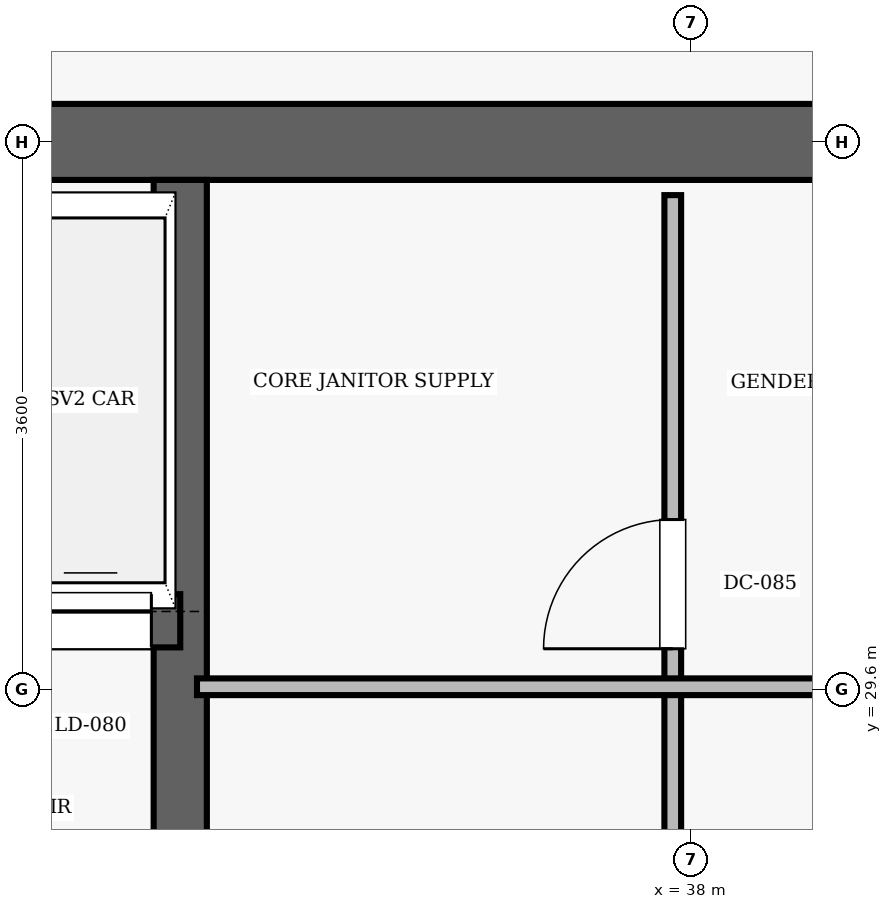
"""IFC4 building model, lengths in metres.
Left out: names, types, materials, properties, quantities, classifications, styles, units other than length and angle.
Written with IfcOpenShell. Run it as: python <this file> out.ifc"""

import sys

from ifc_helpers import new_model, si_unit, direction, frame, frame_2d, origin, place, context, subcontext, project, spatial, rectangle, extrude, element, fill, save


model = new_model("IFC4")
c1 = context("Model", 3, precision=1e-05, world=origin(), true_north=direction((0.0, 1.0)))
c2 = subcontext(c1, "Body", "Model", "MODEL_VIEW")
j1 = project(units=[si_unit("LENGTHUNIT", "METRE"), si_unit("PLANEANGLEUNIT", "RADIAN")], contexts=[c1])
p1 = place(None, origin())
s1 = spatial("IfcSite", under=j1, at=p1, CompositionType="ELEMENT")
p2 = place(p1, origin())
s2 = spatial("IfcBuilding", under=s1, at=p2, CompositionType="ELEMENT")
p3 = place(p2, frame((0.0, 0.0, 178.9)))
s3 = spatial("IfcBuildingStorey", under=s2, at=p3, CompositionType="ELEMENT", Elevation=178.9)
p4 = place(p3, frame((26.75, 33.2, 0.0), z_axis=(0.0, 0.0, 1.0), x_axis=(1.0, 0.0, 0.0)))
e1 = element("IfcWall", 1, at=p4, inside=s3, PredefinedType="SHEAR", context=c2, shape_type="SweptSolid", body=[
    extrude(rectangle(XDim=22.5, YDim=0.5, at=frame_2d((11.25, 0.0))), origin(), (0.0, 0.0, 1.0), 3.85),
])
p5 = place(p4, frame((4.57, 0.0, 0.0)))
e2 = element("IfcOpeningElement", 2, at=p5, cuts=e1, PredefinedType="OPENING", context=c2, shape_type="SweptSolid", body=[
    extrude(rectangle(XDim=1.05, YDim=2.15, at=frame_2d((0.525, 1.075))), frame((0.0, 0.26, 0.0), z_axis=(0.0, -1.0, 0.0), x_axis=(1.0, 0.0, 0.0)), (0.0, 0.0, 1.0), 0.52),
])
p6 = place(p4, frame((14.47, 0.0, 0.0)))
e3 = element("IfcOpeningElement", 3, at=p6, cuts=e1, PredefinedType="OPENING", context=c2, shape_type="SweptSolid", body=[
    extrude(rectangle(XDim=1.05, YDim=2.15, at=frame_2d((0.525, 1.075))), frame((0.0, 0.26, 0.0), z_axis=(0.0, -1.0, 0.0), x_axis=(1.0, 0.0, 0.0)), (0.0, 0.0, 1.0), 0.52),
])
p7 = place(p3, frame((34.64, 26.69, 0.0), z_axis=(0.0, 0.0, 1.0), x_axis=(0.0, 1.0, 0.0)))
e4 = element("IfcWall", 4, at=p7, inside=s3, PredefinedType="SHEAR", context=c2, shape_type="SweptSolid", body=[
    extrude(rectangle(XDim=6.26, YDim=0.35, at=frame_2d((3.13, 0.0))), origin(), (0.0, 0.0, 1.0), 3.85),
])
p8 = place(p3, frame((32.23, 30.05, 0.0), z_axis=(0.0, 0.0, 1.0), x_axis=(1.0, 0.0, 0.0)))
e5 = element("IfcWall", 5, at=p8, inside=s3, PredefinedType="SHEAR", context=c2, shape_type="SweptSolid", body=[
    extrude(rectangle(XDim=2.41, YDim=0.35, at=frame_2d((1.205, 0.0))), origin(), (0.0, 0.0, 1.0), 3.035),
])
p9 = place(p8, frame((0.42, 0.0, 0.0)))
e6 = element("IfcOpeningElement", 6, at=p9, cuts=e5, PredefinedType="OPENING", context=c2, shape_type="SweptSolid", body=[
    extrude(rectangle(XDim=0.8, YDim=2.15, at=frame_2d((0.4, 1.075))), frame((0.0, 0.185, 0.0), z_axis=(0.0, -1.0, 0.0), x_axis=(1.0, 0.0, 0.0)), (0.0, 0.0, 1.0), 0.37),
])
p10 = place(p8, frame((1.42, 0.0, 0.0)))
e7 = element("IfcOpeningElement", 7, at=p10, cuts=e5, PredefinedType="OPENING", context=c2, shape_type="SweptSolid", body=[
    extrude(rectangle(XDim=0.8, YDim=2.15, at=frame_2d((0.4, 1.075))), frame((0.0, 0.185, 0.0), z_axis=(0.0, -1.0, 0.0), x_axis=(1.0, 0.0, 0.0)), (0.0, 0.0, 1.0), 0.37),
])
p11 = place(p3, frame((37.88, 23.05, 0.0), z_axis=(0.0, 0.0, 1.0), x_axis=(0.0, 1.0, 0.0)))
e8 = element("IfcWall", 8, at=p11, inside=s3, PredefinedType="PARTITIONING", context=c2, shape_type="SweptSolid", body=[
    extrude(rectangle(XDim=9.8, YDim=0.11, at=frame_2d((4.9, 0.0))), origin(), (0.0, 0.0, 1.0), 3.035),
])
p12 = place(p11, frame((0.25, 0.0, 0.0)))
e9 = element("IfcOpeningElement", 9, at=p12, cuts=e8, PredefinedType="OPENING", context=c2, shape_type="SweptSolid", body=[
    extrude(rectangle(XDim=0.85, YDim=2.1, at=frame_2d((0.425, 1.05))), frame((0.0, 0.065, 0.0), z_axis=(0.0, -1.0, 0.0), x_axis=(1.0, 0.0, 0.0)), (0.0, 0.0, 1.0), 0.13),
])
p13 = place(p11, frame((3.582, 0.0, 0.0)))
e10 = element("IfcOpeningElement", 10, at=p13, cuts=e8, PredefinedType="OPENING", context=c2, shape_type="SweptSolid", body=[
    extrude(rectangle(XDim=0.85, YDim=2.1, at=frame_2d((0.425, 1.05))), frame((0.0, 0.065, 0.0), z_axis=(0.0, -1.0, 0.0), x_axis=(1.0, 0.0, 0.0)), (0.0, 0.0, 1.0), 0.13),
])
p14 = place(p11, frame((6.816, 0.0, 0.0)))
e11 = element("IfcOpeningElement", 11, at=p14, cuts=e8, PredefinedType="OPENING", context=c2, shape_type="SweptSolid", body=[
    extrude(rectangle(XDim=0.85, YDim=2.1, at=frame_2d((0.425, 1.05))), frame((0.0, 0.065, 0.0), z_axis=(0.0, -1.0, 0.0), x_axis=(1.0, 0.0, 0.0)), (0.0, 0.0, 1.0), 0.13),
])
p15 = place(p3, frame((34.75, 29.616, 0.0), z_axis=(0.0, 0.0, 1.0), x_axis=(1.0, 0.0, 0.0)))
e12 = element("IfcWall", 12, at=p15, inside=s3, PredefinedType="PARTITIONING", context=c2, shape_type="SweptSolid", body=[
    extrude(rectangle(XDim=6.25, YDim=0.11, at=frame_2d((3.125, 0.0))), origin(), (0.0, 0.0, 1.0), 3.035),
])
p16 = place(p14, origin())
e13 = element("IfcDoor", 13, at=p16, inside=s3, OperationType="SINGLE_SWING_LEFT", PredefinedType="DOOR", context=c2, shape_type="SweptSolid", body=[
    extrude(rectangle(XDim=0.85, YDim=2.1, at=frame_2d((0.425, 1.05))), frame((0.0, 0.025, 0.0), z_axis=(0.0, -1.0, 0.0), x_axis=(1.0, 0.0, 0.0)), (0.0, 0.0, 1.0), 0.05),
])
fill(e11, e13)
p17 = place(p10, origin())
e14 = element("IfcDoor", 14, at=p17, inside=s3, OperationType="SLIDING_TO_LEFT", PredefinedType="DOOR", context=c2, shape_type="SweptSolid", body=[
    extrude(rectangle(XDim=0.8, YDim=2.15, at=frame_2d((0.4, 1.075))), frame((0.0, 0.025, 0.0), z_axis=(0.0, -1.0, 0.0), x_axis=(1.0, 0.0, 0.0)), (0.0, 0.0, 1.0), 0.05),
])
fill(e7, e14)
save(model, sys.argv[1])
